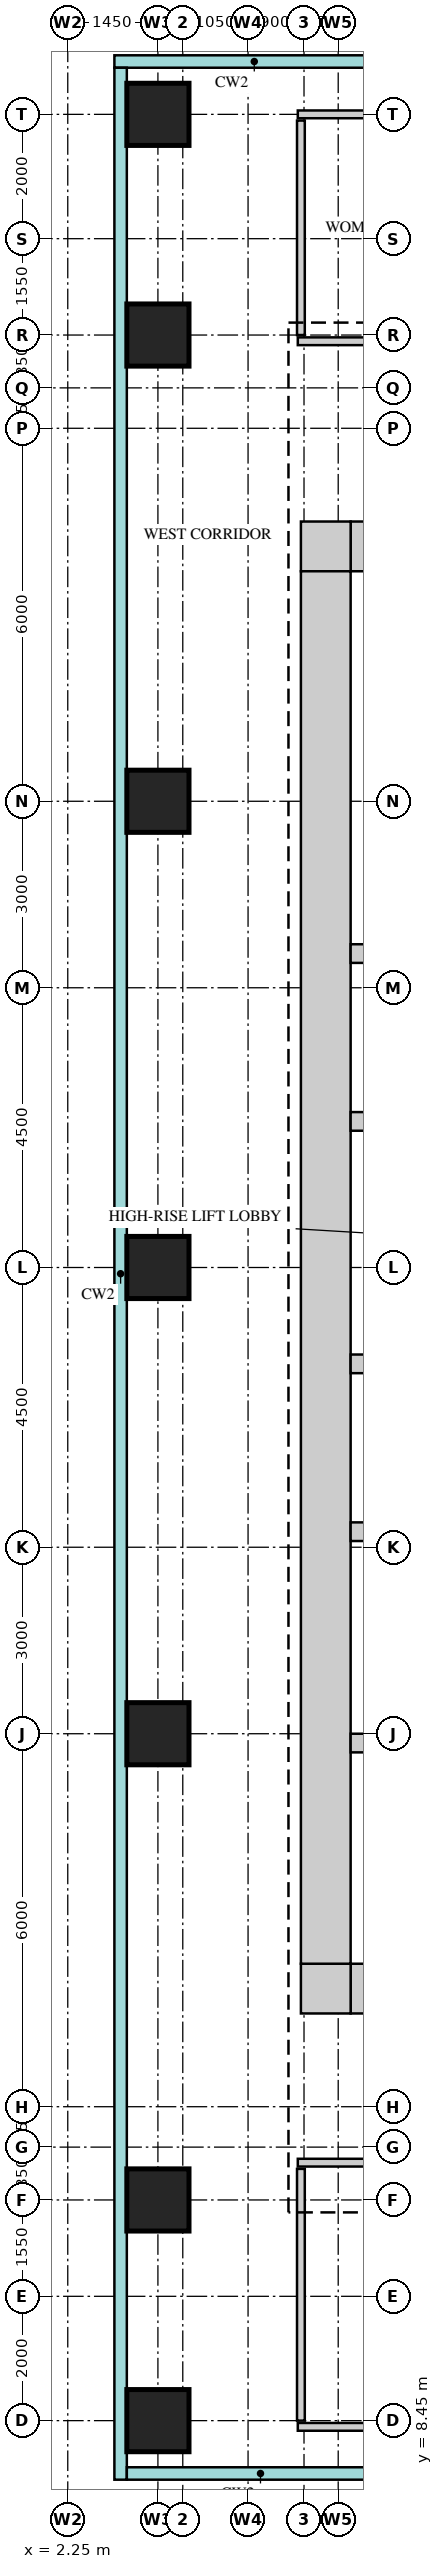
"""IFC4 building model, lengths in metres.
Left out: names, types, materials, properties, quantities, classifications, styles, units other than length and angle.
Written with IfcOpenShell. Run it as: python <this file> out.ifc"""

import sys

from ifc_helpers import new_model, si_unit, direction, frame, frame_2d, origin, origin_2d, place, context, subcontext, project, spatial, rectangle, extrude, source, transform, mapped, element, save


model = new_model("IFC4")
c1 = context("Model", 3, precision=1e-05, world=origin(), true_north=direction((0.0, 1.0)))
c2 = subcontext(c1, "Body", "Model", "MODEL_VIEW")
j1 = project(units=[si_unit("LENGTHUNIT", "METRE"), si_unit("PLANEANGLEUNIT", "RADIAN")], contexts=[c1])
p1 = place(None, origin())
s1 = spatial("IfcSite", under=j1, at=p1, CompositionType="ELEMENT")
p2 = place(p1, origin())
s2 = spatial("IfcBuilding", under=s1, at=p2, CompositionType="ELEMENT")
p3 = place(p2, frame((0.0, 0.0, 172.7)))
s3 = spatial("IfcBuildingStorey", under=s2, at=p3, CompositionType="ELEMENT", Elevation=172.7)
m1 = source(origin(), c2, "Body", "SweptSolid", [
    extrude(rectangle(XDim=13.4, YDim=0.8, at=frame_2d((6.7, 0.0))), origin(), (0.0, 0.0, 1.0), 3.75),
])
p4 = place(p3, frame((6.8, 38.6, 0.0), z_axis=(0.0, 0.0, 1.0), x_axis=(1.0, 0.0, 0.0)))
e1 = element("IfcWall", 1, at=p4, inside=s3, PredefinedType="SHEAR", context=c2, shape_type="MappedRepresentation", body=[
    mapped(m1, transform((0.0, 0.0, 0.0))),
])
m2 = source(origin(), c2, "Body", "SweptSolid", [
    extrude(rectangle(XDim=0.9, YDim=2.1, at=frame_2d((0.45, 1.05))), frame((0.0, 0.41, 0.0), z_axis=(0.0, -1.0, 0.0), x_axis=(1.0, 0.0, 0.0)), (0.0, 0.0, 1.0), 0.82),
])
p5 = place(p4, frame((2.9, 0.0, 0.0)))
e2 = element("IfcOpeningElement", 2, at=p5, cuts=e1, PredefinedType="OPENING", context=c2, shape_type="MappedRepresentation", body=[
    mapped(m2, transform((0.0, 0.0, 0.0))),
])
p6 = place(p4, frame((9.6, 0.0, 0.0)))
e3 = element("IfcOpeningElement", 3, at=p6, cuts=e1, PredefinedType="OPENING", context=c2, shape_type="MappedRepresentation", body=[
    mapped(m2, transform((0.0, 0.0, 0.0))),
])
m3 = source(origin(), c2, "Body", "SweptSolid", [
    extrude(rectangle(XDim=0.8, YDim=0.8, at=frame_2d((0.4, 0.0))), origin(), (0.0, 0.0, 1.0), 3.75),
])
p7 = place(p3, frame((6.0, 38.6, 0.0), z_axis=(0.0, 0.0, 1.0), x_axis=(1.0, 0.0, 0.0)))
e4 = element("IfcWall", 4, at=p7, inside=s3, PredefinedType="SHEAR", context=c2, shape_type="MappedRepresentation", body=[
    mapped(m3, transform((0.0, 0.0, 0.0))),
])
p8 = place(p3, frame((6.8, 15.4, 0.0), z_axis=(0.0, 0.0, 1.0), x_axis=(1.0, 0.0, 0.0)))
e5 = element("IfcWall", 5, at=p8, inside=s3, PredefinedType="SHEAR", context=c2, shape_type="MappedRepresentation", body=[
    mapped(m1, transform((0.0, 0.0, 0.0))),
])
m4 = source(origin(), c2, "Body", "SweptSolid", [
    extrude(rectangle(XDim=1.2, YDim=2.1, at=frame_2d((0.6, 1.05))), frame((0.0, 0.41, 0.0), z_axis=(0.0, -1.0, 0.0), x_axis=(1.0, 0.0, 0.0)), (0.0, 0.0, 1.0), 0.82),
])
p9 = place(p8, frame((5.4, 0.0, 0.0)))
e6 = element("IfcOpeningElement", 6, at=p9, cuts=e5, PredefinedType="OPENING", context=c2, shape_type="MappedRepresentation", body=[
    mapped(m4, transform((0.0, 0.0, 0.0))),
])
p10 = place(p8, frame((2.05, 0.0, 0.0)))
e7 = element("IfcOpeningElement", 7, at=p10, cuts=e5, PredefinedType="OPENING", context=c2, shape_type="MappedRepresentation", body=[
    mapped(m4, transform((0.0, 0.0, 0.0))),
])
m5 = source(origin(), c2, "Body", "SweptSolid", [
    extrude(rectangle(XDim=1.0, YDim=2.1, at=frame_2d((0.5, 1.05))), frame((0.0, 0.41, 0.0), z_axis=(0.0, -1.0, 0.0), x_axis=(1.0, 0.0, 0.0)), (0.0, 0.0, 1.0), 0.82),
])
p11 = place(p8, frame((7.9, 0.0, 0.0)))
e8 = element("IfcOpeningElement", 8, at=p11, cuts=e5, PredefinedType="OPENING", context=c2, shape_type="MappedRepresentation", body=[
    mapped(m5, transform((0.0, 0.0, 0.0))),
])
p12 = place(p3, frame((6.0, 15.4, 0.0), z_axis=(0.0, 0.0, 1.0), x_axis=(1.0, 0.0, 0.0)))
e9 = element("IfcWall", 9, at=p12, inside=s3, PredefinedType="SHEAR", context=c2, shape_type="MappedRepresentation", body=[
    mapped(m3, transform((0.0, 0.0, 0.0))),
])
m6 = source(origin(), c2, "Body", "SweptSolid", [
    extrude(rectangle(XDim=22.4, YDim=0.8, at=frame_2d((11.2, 0.0))), origin(), (0.0, 0.0, 1.0), 3.75),
])
p13 = place(p3, frame((6.4, 15.8, 0.0), z_axis=(0.0, 0.0, 1.0), x_axis=(0.0, 1.0, 0.0)))
e10 = element("IfcWall", 10, at=p13, inside=s3, PredefinedType="SHEAR", context=c2, shape_type="MappedRepresentation", body=[
    mapped(m6, transform((0.0, 0.0, 0.0))),
])
m7 = source(origin(), c2, "Body", "SweptSolid", [
    extrude(rectangle(XDim=13.4, YDim=0.3, at=frame_2d((6.7, 0.0))), origin(), (0.0, 0.0, 1.0), 3.75),
])
p14 = place(p3, frame((6.8, 22.75, 0.0), z_axis=(0.0, 0.0, 1.0), x_axis=(1.0, 0.0, 0.0)))
e11 = element("IfcWall", 11, at=p14, inside=s3, PredefinedType="STANDARD", context=c2, shape_type="MappedRepresentation", body=[
    mapped(m7, transform((0.0, 0.0, 0.0))),
])
m8 = source(origin(), c2, "Body", "SweptSolid", [
    extrude(rectangle(XDim=9.275, YDim=0.3, at=frame_2d((4.637, 0.0))), origin(), (0.0, 0.0, 1.0), 3.75),
])
p15 = place(p3, frame((6.8, 19.35, 0.0), z_axis=(0.0, 0.0, 1.0), x_axis=(1.0, 0.0, 0.0)))
e12 = element("IfcWall", 12, at=p15, inside=s3, PredefinedType="STANDARD", context=c2, shape_type="MappedRepresentation", body=[
    mapped(m8, transform((0.0, 0.0, 0.0))),
])
m9 = source(origin(), c2, "Body", "SweptSolid", [
    extrude(rectangle(XDim=1.2, YDim=2.1, at=frame_2d((0.6, 1.05))), frame((0.0, 0.16, 0.0), z_axis=(0.0, -1.0, 0.0), x_axis=(1.0, 0.0, 0.0)), (0.0, 0.0, 1.0), 0.32),
])
p16 = place(p15, frame((0.85, 0.0, 0.0)))
e13 = element("IfcOpeningElement", 13, at=p16, cuts=e12, PredefinedType="OPENING", context=c2, shape_type="MappedRepresentation", body=[
    mapped(m9, transform((0.0, 0.0, 0.0))),
])
p17 = place(p15, frame((3.2, 0.0, 0.0)))
e14 = element("IfcOpeningElement", 14, at=p17, cuts=e12, PredefinedType="OPENING", context=c2, shape_type="MappedRepresentation", body=[
    mapped(m9, transform((0.0, 0.0, 0.0))),
])
p18 = place(p15, frame((5.45, 0.0, 0.0)))
e15 = element("IfcOpeningElement", 15, at=p18, cuts=e12, PredefinedType="OPENING", context=c2, shape_type="MappedRepresentation", body=[
    mapped(m9, transform((0.0, 0.0, 0.0))),
])
p19 = place(p15, frame((7.6, 0.0, 0.0)))
e16 = element("IfcOpeningElement", 16, at=p19, cuts=e12, PredefinedType="OPENING", context=c2, shape_type="MappedRepresentation", body=[
    mapped(m9, transform((0.0, 0.0, 0.0))),
])
p20 = place(p3, frame((6.8, 32.05, 0.0), z_axis=(0.0, 0.0, 1.0), x_axis=(1.0, 0.0, 0.0)))
e17 = element("IfcWall", 17, at=p20, inside=s3, PredefinedType="STANDARD", context=c2, shape_type="MappedRepresentation", body=[
    mapped(m7, transform((0.0, 0.0, 0.0))),
])
p21 = place(p3, frame((6.8, 29.35, 0.0), z_axis=(0.0, 0.0, 1.0), x_axis=(1.0, 0.0, 0.0)))
e18 = element("IfcWall", 18, at=p21, inside=s3, PredefinedType="STANDARD", context=c2, shape_type="MappedRepresentation", body=[
    mapped(m7, transform((0.0, 0.0, 0.0))),
])
p22 = place(p21, frame((0.95, 0.0, 0.0)))
e19 = element("IfcOpeningElement", 19, at=p22, cuts=e18, PredefinedType="OPENING", context=c2, shape_type="MappedRepresentation", body=[
    mapped(m9, transform((0.0, 0.0, 0.0))),
])
p23 = place(p21, frame((3.5, 0.0, 0.0)))
e20 = element("IfcOpeningElement", 20, at=p23, cuts=e18, PredefinedType="OPENING", context=c2, shape_type="MappedRepresentation", body=[
    mapped(m9, transform((0.0, 0.0, 0.0))),
])
p24 = place(p21, frame((6.05, 0.0, 0.0)))
e21 = element("IfcOpeningElement", 21, at=p24, cuts=e18, PredefinedType="OPENING", context=c2, shape_type="MappedRepresentation", body=[
    mapped(m9, transform((0.0, 0.0, 0.0))),
])
p25 = place(p21, frame((8.6, 0.0, 0.0)))
e22 = element("IfcOpeningElement", 22, at=p25, cuts=e18, PredefinedType="OPENING", context=c2, shape_type="MappedRepresentation", body=[
    mapped(m9, transform((0.0, 0.0, 0.0))),
])
p26 = place(p21, frame((11.15, 0.0, 0.0)))
e23 = element("IfcOpeningElement", 23, at=p26, cuts=e18, PredefinedType="OPENING", context=c2, shape_type="MappedRepresentation", body=[
    mapped(m9, transform((0.0, 0.0, 0.0))),
])
p27 = place(p3, frame((6.8, 25.45, 0.0), z_axis=(0.0, 0.0, 1.0), x_axis=(1.0, 0.0, 0.0)))
e24 = element("IfcWall", 24, at=p27, inside=s3, PredefinedType="STANDARD", context=c2, shape_type="MappedRepresentation", body=[
    mapped(m7, transform((0.0, 0.0, 0.0))),
])
p28 = place(p27, frame((0.95, 0.0, 0.0)))
e25 = element("IfcOpeningElement", 25, at=p28, cuts=e24, PredefinedType="OPENING", context=c2, shape_type="MappedRepresentation", body=[
    mapped(m9, transform((0.0, 0.0, 0.0))),
])
p29 = place(p27, frame((3.5, 0.0, 0.0)))
e26 = element("IfcOpeningElement", 26, at=p29, cuts=e24, PredefinedType="OPENING", context=c2, shape_type="MappedRepresentation", body=[
    mapped(m9, transform((0.0, 0.0, 0.0))),
])
p30 = place(p27, frame((6.05, 0.0, 0.0)))
e27 = element("IfcOpeningElement", 27, at=p30, cuts=e24, PredefinedType="OPENING", context=c2, shape_type="MappedRepresentation", body=[
    mapped(m9, transform((0.0, 0.0, 0.0))),
])
p31 = place(p27, frame((8.6, 0.0, 0.0)))
e28 = element("IfcOpeningElement", 28, at=p31, cuts=e24, PredefinedType="OPENING", context=c2, shape_type="MappedRepresentation", body=[
    mapped(m9, transform((0.0, 0.0, 0.0))),
])
p32 = place(p27, frame((11.15, 0.0, 0.0)))
e29 = element("IfcOpeningElement", 29, at=p32, cuts=e24, PredefinedType="OPENING", context=c2, shape_type="MappedRepresentation", body=[
    mapped(m9, transform((0.0, 0.0, 0.0))),
])
m10 = source(origin(), c2, "Body", "SweptSolid", [
    extrude(rectangle(XDim=1.0, YDim=1.0, at=origin_2d()), origin(), (0.0, 0.0, 1.0), 3.75),
])
for number, where, z_axis, x_axis in (
    (30, (3.7, 8.45, 0.0), (0.0, 0.0, 1.0), (1.0, 0.0, 0.0)),
    (31, (3.7, 12.0, 0.0), (0.0, 0.0, 1.0), (1.0, 0.0, 0.0)),
    (32, (3.7, 19.5, 0.0), (0.0, 0.0, 1.0), (1.0, 0.0, 0.0)),
    (33, (3.7, 27.0, 0.0), (0.0, 0.0, 1.0), (1.0, 0.0, 0.0)),
    (34, (3.7, 34.5, 0.0), (0.0, 0.0, 1.0), (1.0, 0.0, 0.0)),
    (35, (3.7, 42.0, 0.0), (0.0, 0.0, 1.0), (1.0, 0.0, 0.0)),
    (36, (3.7, 45.55, 0.0), (0.0, 0.0, 1.0), (1.0, 0.0, 0.0)),
):
    element("IfcColumn", number, at=place(p3, frame(where, z_axis=z_axis, x_axis=x_axis)), inside=s3, PredefinedType="COLUMN", context=c2, shape_type="MappedRepresentation", body=[
        mapped(m10, transform((0.0, 0.0, 0.0))),
    ])
m11 = source(origin(), c2, "Body", "SweptSolid", [
    extrude(rectangle(XDim=7.95, YDim=0.125, at=frame_2d((3.975, 0.0))), origin(), (0.0, 0.0, 1.0), 3.25),
])
p33 = place(p3, frame((5.95, 8.35, 0.0), z_axis=(0.0, 0.0, 1.0), x_axis=(1.0, 0.0, 0.0)))
e37 = element("IfcWall", 37, at=p33, inside=s3, PredefinedType="PARTITIONING", context=c2, shape_type="MappedRepresentation", body=[
    mapped(m11, transform((0.0, 0.0, 0.0))),
])
m12 = source(origin(), c2, "Body", "SweptSolid", [
    extrude(rectangle(XDim=0.9, YDim=2.1, at=frame_2d((0.45, 1.05))), frame((0.0, 0.073, 0.0), z_axis=(0.0, -1.0, 0.0), x_axis=(1.0, 0.0, 0.0)), (0.0, 0.0, 1.0), 0.145),
])
p34 = place(p33, frame((3.8, 0.0, 0.0)))
e38 = element("IfcOpeningElement", 38, at=p34, cuts=e37, PredefinedType="OPENING", context=c2, shape_type="MappedRepresentation", body=[
    mapped(m12, transform((0.0, 0.0, 0.0))),
])
m13 = source(origin(), c2, "Body", "SweptSolid", [
    extrude(rectangle(XDim=4.05, YDim=0.125, at=frame_2d((2.025, 0.0))), origin(), (0.0, 0.0, 1.0), 3.8),
])
p35 = place(p3, frame((6.0, 8.45, 0.0), z_axis=(0.0, 0.0, 1.0), x_axis=(0.0, 1.0, 0.0)))
e39 = element("IfcWall", 39, at=p35, inside=s3, PredefinedType="PARTITIONING", context=c2, shape_type="MappedRepresentation", body=[
    mapped(m13, transform((0.0, 0.0, 0.0))),
])
m14 = source(origin(), c2, "Body", "SweptSolid", [
    extrude(rectangle(XDim=8.0, YDim=0.125, at=frame_2d((4.0, 0.0))), origin(), (0.0, 0.0, 1.0), 3.8),
])
p36 = place(p3, frame((5.95, 12.6, 0.0), z_axis=(0.0, 0.0, 1.0), x_axis=(1.0, 0.0, 0.0)))
e40 = element("IfcWall", 40, at=p36, inside=s3, PredefinedType="PARTITIONING", context=c2, shape_type="MappedRepresentation", body=[
    mapped(m14, transform((0.0, 0.0, 0.0))),
])
m15 = source(origin(), c2, "Body", "SweptSolid", [
    extrude(rectangle(XDim=7.95, YDim=0.125, at=frame_2d((3.975, 0.0))), origin(), (0.0, 0.0, 1.0), 3.8),
])
p37 = place(p3, frame((5.95, 41.9, 0.0), z_axis=(0.0, 0.0, 1.0), x_axis=(1.0, 0.0, 0.0)))
e41 = element("IfcWall", 41, at=p37, inside=s3, PredefinedType="PARTITIONING", context=c2, shape_type="MappedRepresentation", body=[
    mapped(m15, transform((0.0, 0.0, 0.0))),
])
p38 = place(p37, frame((1.55, 0.0, 0.0)))
e42 = element("IfcOpeningElement", 42, at=p38, cuts=e41, PredefinedType="OPENING", context=c2, shape_type="MappedRepresentation", body=[
    mapped(m12, transform((0.0, 0.0, 0.0))),
])
p39 = place(p37, frame((5.65, 0.0, 0.0)))
e43 = element("IfcOpeningElement", 43, at=p39, cuts=e41, PredefinedType="OPENING", context=c2, shape_type="MappedRepresentation", body=[
    mapped(m12, transform((0.0, 0.0, 0.0))),
])
m16 = source(origin(), c2, "Body", "SweptSolid", [
    extrude(rectangle(XDim=3.45, YDim=0.125, at=frame_2d((1.725, 0.0))), origin(), (0.0, 0.0, 1.0), 3.8),
])
p40 = place(p3, frame((6.0, 42.0, 0.0), z_axis=(0.0, 0.0, 1.0), x_axis=(0.0, 1.0, 0.0)))
e44 = element("IfcWall", 44, at=p40, inside=s3, PredefinedType="PARTITIONING", context=c2, shape_type="MappedRepresentation", body=[
    mapped(m16, transform((0.0, 0.0, 0.0))),
])
p41 = place(p3, frame((5.95, 45.55, 0.0), z_axis=(0.0, 0.0, 1.0), x_axis=(1.0, 0.0, 0.0)))
e45 = element("IfcWall", 45, at=p41, inside=s3, PredefinedType="PARTITIONING", context=c2, shape_type="MappedRepresentation", body=[
    mapped(m11, transform((0.0, 0.0, 0.0))),
])
save(model, sys.argv[1])
